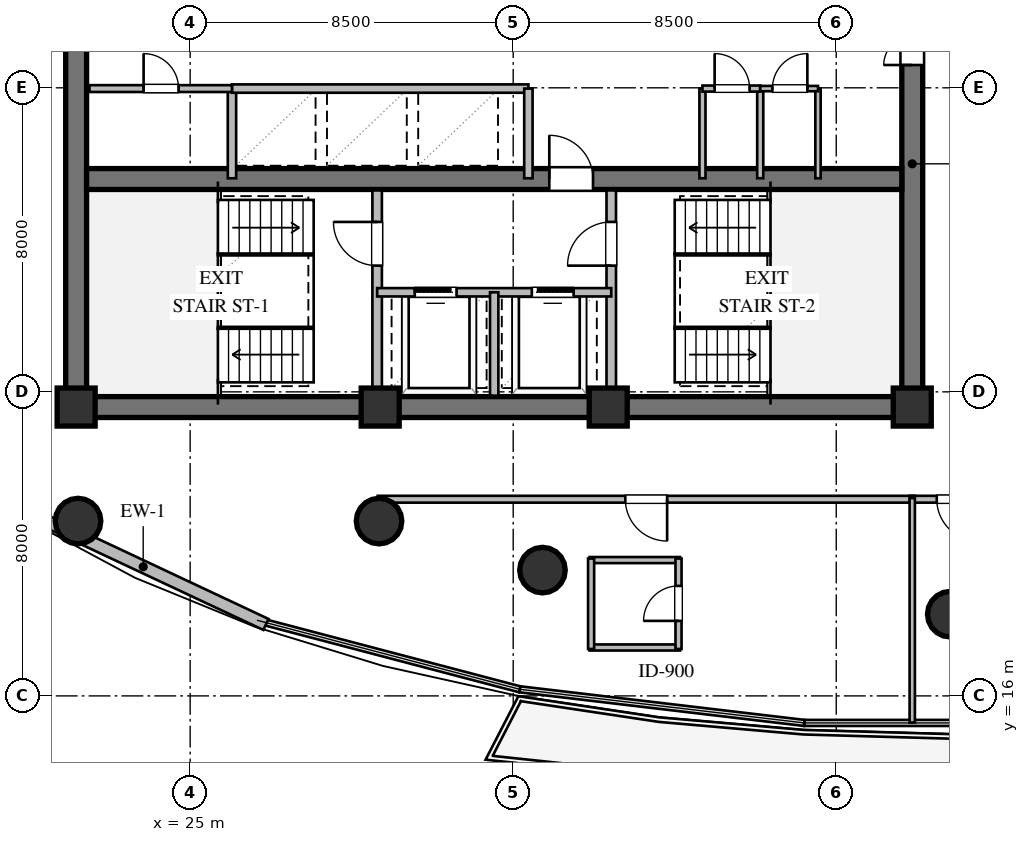
"""IFC4 building model, lengths in metres.
Left out: names, types, materials, properties, quantities, classifications, styles, units other than length and angle.
Written with IfcOpenShell. Run it as: python <this file> out.ifc"""

import sys

from ifc_helpers import new_model, si_unit, direction, frame, frame_2d, origin, origin_2d, place, context, subcontext, project, spatial, rectangle, circle, extrude, element, fill, save


model = new_model("IFC4")
c1 = context("Model", 3, precision=1e-05, world=origin(), true_north=direction((0.0, 1.0)))
c2 = subcontext(c1, "Body", "Model", "MODEL_VIEW")
j1 = project(units=[si_unit("LENGTHUNIT", "METRE"), si_unit("PLANEANGLEUNIT", "RADIAN")], contexts=[c1])
p1 = place(None, origin())
s1 = spatial("IfcSite", under=j1, at=p1, CompositionType="ELEMENT")
p2 = place(p1, origin())
s2 = spatial("IfcBuilding", under=s1, at=p2, CompositionType="ELEMENT")
p3 = place(p2, frame((0.0, 0.0, 163.8)))
s3 = spatial("IfcBuildingStorey", under=s2, at=p3, CompositionType="ELEMENT", Elevation=163.8)
p4 = place(p3, frame((21.725, 23.6, 0.0), z_axis=(0.0, 0.0, 1.0), x_axis=(1.0, 0.0, 0.0)))
e1 = element("IfcWall", 1, at=p4, inside=s3, PredefinedType="SHEAR", context=c2, shape_type="SweptSolid", body=[
    extrude(rectangle(XDim=22.55, YDim=0.55, at=frame_2d((11.275, 0.0))), origin(), (0.0, 0.0, 1.0), 3.36),
])
p5 = place(p3, frame((22.0, 23.875, 0.0), z_axis=(0.0, 0.0, 1.0), x_axis=(0.0, 1.0, 0.0)))
e2 = element("IfcWall", 2, at=p5, inside=s3, PredefinedType="SHEAR", context=c2, shape_type="SweptSolid", body=[
    extrude(rectangle(XDim=12.25, YDim=0.55, at=frame_2d((6.125, 0.0))), origin(), (0.0, 0.0, 1.0), 3.36),
])
p6 = place(p3, frame((44.0, 23.875, 0.0), z_axis=(0.0, 0.0, 1.0), x_axis=(0.0, 1.0, 0.0)))
e3 = element("IfcWall", 3, at=p6, inside=s3, PredefinedType="SHEAR", context=c2, shape_type="SweptSolid", body=[
    extrude(rectangle(XDim=12.25, YDim=0.55, at=frame_2d((6.125, 0.0))), origin(), (0.0, 0.0, 1.0), 3.36),
])
p7 = place(p6, frame((8.725, 0.0, 0.0)))
e4 = element("IfcOpeningElement", 4, at=p7, cuts=e3, PredefinedType="OPENING", context=c2, shape_type="SweptSolid", body=[
    extrude(rectangle(XDim=1.5, YDim=2.15, at=frame_2d((0.75, 1.075))), frame((0.0, 0.285, 0.0), z_axis=(0.0, -1.0, 0.0), x_axis=(1.0, 0.0, 0.0)), (0.0, 0.0, 1.0), 0.57),
])
p8 = place(p3, frame((22.275, 29.6, 0.0), z_axis=(0.0, 0.0, 1.0), x_axis=(1.0, 0.0, 0.0)))
e5 = element("IfcWall", 5, at=p8, inside=s3, PredefinedType="SHEAR", context=c2, shape_type="SweptSolid", body=[
    extrude(rectangle(XDim=21.45, YDim=0.55, at=frame_2d((10.725, 0.0))), origin(), (0.0, 0.0, 1.0), 3.36),
])
p9 = place(p8, frame((12.175, 0.0, 0.0)))
e6 = element("IfcOpeningElement", 6, at=p9, cuts=e5, PredefinedType="OPENING", context=c2, shape_type="SweptSolid", body=[
    extrude(rectangle(XDim=1.15, YDim=2.1, at=frame_2d((0.575, 1.05))), frame((0.0, 0.285, 0.0), z_axis=(0.0, -1.0, 0.0), x_axis=(1.0, 0.0, 0.0)), (0.0, 0.0, 1.0), 0.57),
])
for number, where, z_axis, x_axis in (
    (7, (22.0, 23.6, 0.0), (0.0, 0.0, 1.0), (1.0, 0.0, 0.0)),
    (8, (30.0, 23.6, 0.0), (0.0, 0.0, 1.0), (1.0, 0.0, 0.0)),
    (9, (36.0, 23.6, 0.0), (0.0, 0.0, 1.0), (1.0, 0.0, 0.0)),
    (10, (44.0, 23.6, 0.0), (0.0, 0.0, 1.0), (1.0, 0.0, 0.0)),
):
    element("IfcColumn", number, at=place(p3, frame(where, z_axis=z_axis, x_axis=x_axis)), inside=s3, PredefinedType="COLUMN", context=c2, shape_type="SweptSolid", body=[
        extrude(rectangle(XDim=1.0, YDim=1.0, at=origin_2d()), origin(), (0.0, 0.0, 1.0), 3.6),
    ])
for number, where, z_axis, x_axis in (
    (11, (22.05, 20.6, 0.0), (0.0, 0.0, 1.0), (1.0, 0.0, 0.0)),
    (12, (29.97, 20.6, 0.0), (0.0, 0.0, 1.0), (1.0, 0.0, 0.0)),
    (13, (34.27, 19.31, 0.0), (0.0, 0.0, 1.0), (1.0, 0.0, 0.0)),
    (14, (45.0, 18.15, 0.0), (0.0, 0.0, 1.0), (1.0, 0.0, 0.0)),
):
    element("IfcColumn", number, at=place(p3, frame(where, z_axis=z_axis, x_axis=x_axis)), inside=s3, PredefinedType="COLUMN", context=c2, shape_type="SweptSolid", body=[
        extrude(circle(Radius=0.6, at=origin_2d()), origin(), (0.0, 0.0, 1.0), 3.6),
    ])
p10 = place(p3, frame((26.994, 17.88, 0.0), z_axis=(0.0, 0.0, 1.0), x_axis=(-0.905106920297, 0.425184034073, 0.0)))
e15 = element("IfcWall", 15, at=p10, inside=s3, PredefinedType="STANDARD", context=c2, shape_type="SweptSolid", body=[
    extrude(rectangle(XDim=7.136, YDim=0.32, at=frame_2d((3.568, 0.0))), origin(), (0.0, 0.0, 1.0), 2.657),
])
p11 = place(p3, frame((29.92, 23.9, 0.0), z_axis=(0.0, 0.0, 1.0), x_axis=(0.0, 1.0, 0.0)))
e16 = element("IfcWall", 16, at=p11, inside=s3, PredefinedType="SOLIDWALL", context=c2, shape_type="SweptSolid", body=[
    extrude(rectangle(XDim=5.4, YDim=0.25, at=frame_2d((2.7, 0.0))), origin(), (0.0, 0.0, 1.0), 2.89),
])
p12 = place(p11, frame((3.421, 0.0, 0.0)))
e17 = element("IfcOpeningElement", 17, at=p12, cuts=e16, PredefinedType="OPENING", context=c2, shape_type="SweptSolid", body=[
    extrude(rectangle(XDim=1.15, YDim=2.1, at=frame_2d((0.575, 1.05))), frame((0.0, 0.135, 0.0), z_axis=(0.0, -1.0, 0.0), x_axis=(1.0, 0.0, 0.0)), (0.0, 0.0, 1.0), 0.27),
])
p13 = place(p3, frame((36.08, 23.9, 0.0), z_axis=(0.0, 0.0, 1.0), x_axis=(0.0, 1.0, 0.0)))
e18 = element("IfcWall", 18, at=p13, inside=s3, PredefinedType="SOLIDWALL", context=c2, shape_type="SweptSolid", body=[
    extrude(rectangle(XDim=5.4, YDim=0.25, at=frame_2d((2.7, 0.0))), origin(), (0.0, 0.0, 1.0), 3.36),
])
p14 = place(p13, frame((3.421, 0.0, 0.0)))
e19 = element("IfcOpeningElement", 19, at=p14, cuts=e18, PredefinedType="OPENING", context=c2, shape_type="SweptSolid", body=[
    extrude(rectangle(XDim=1.15, YDim=2.1, at=frame_2d((0.575, 1.05))), frame((0.0, 0.135, 0.0), z_axis=(0.0, -1.0, 0.0), x_axis=(1.0, 0.0, 0.0)), (0.0, 0.0, 1.0), 0.27),
])
p15 = place(p3, frame((29.92, 26.62, 0.0), z_axis=(0.0, 0.0, 1.0), x_axis=(1.0, 0.0, 0.0)))
e20 = element("IfcWall", 20, at=p15, inside=s3, PredefinedType="SOLIDWALL", context=c2, shape_type="SweptSolid", body=[
    extrude(rectangle(XDim=6.16, YDim=0.22, at=frame_2d((3.08, 0.0))), origin(), (0.0, 0.0, 1.0), 3.36),
])
p16 = place(p15, frame((0.99, 0.0, 0.0)))
e21 = element("IfcOpeningElement", 21, at=p16, cuts=e20, PredefinedType="OPENING", context=c2, shape_type="SweptSolid", body=[
    extrude(rectangle(XDim=1.1, YDim=2.1, at=frame_2d((0.55, 1.05))), frame((0.0, 0.12, 0.0), z_axis=(0.0, -1.0, 0.0), x_axis=(1.0, 0.0, 0.0)), (0.0, 0.0, 1.0), 0.24),
])
p17 = place(p15, frame((4.07, 0.0, 0.0)))
e22 = element("IfcOpeningElement", 22, at=p17, cuts=e20, PredefinedType="OPENING", context=c2, shape_type="SweptSolid", body=[
    extrude(rectangle(XDim=1.1, YDim=2.1, at=frame_2d((0.55, 1.05))), frame((0.0, 0.12, 0.0), z_axis=(0.0, -1.0, 0.0), x_axis=(1.0, 0.0, 0.0)), (0.0, 0.0, 1.0), 0.24),
])
p18 = place(p3, frame((33.0, 23.9, 0.0), z_axis=(0.0, 0.0, 1.0), x_axis=(0.0, 1.0, 0.0)))
e23 = element("IfcWall", 23, at=p18, inside=s3, PredefinedType="SOLIDWALL", context=c2, shape_type="SweptSolid", body=[
    extrude(rectangle(XDim=2.72, YDim=0.22, at=frame_2d((1.36, 0.0))), origin(), (0.0, 0.0, 1.0), 3.36),
])
p19 = place(p3, frame((26.1, 29.62, 0.0), z_axis=(0.0, 0.0, 1.0), x_axis=(0.0, 1.0, 0.0)))
e24 = element("IfcWall", 24, at=p19, inside=s3, PredefinedType="SOLIDWALL", context=c2, shape_type="SweptSolid", body=[
    extrude(rectangle(XDim=2.36, YDim=0.22, at=frame_2d((1.18, 0.0))), origin(), (0.0, 0.0, 1.0), 3.36),
])
p20 = place(p3, frame((26.1, 31.98, 0.0), z_axis=(0.0, 0.0, 1.0), x_axis=(1.0, 0.0, 0.0)))
e25 = element("IfcWall", 25, at=p20, inside=s3, PredefinedType="SOLIDWALL", context=c2, shape_type="SweptSolid", body=[
    extrude(rectangle(XDim=7.8, YDim=0.22, at=frame_2d((3.9, 0.0))), origin(), (0.0, 0.0, 1.0), 3.36),
])
p21 = place(p3, frame((33.9, 29.62, 0.0), z_axis=(0.0, 0.0, 1.0), x_axis=(0.0, 1.0, 0.0)))
e26 = element("IfcWall", 26, at=p21, inside=s3, PredefinedType="SOLIDWALL", context=c2, shape_type="SweptSolid", body=[
    extrude(rectangle(XDim=2.36, YDim=0.22, at=frame_2d((1.18, 0.0))), origin(), (0.0, 0.0, 1.0), 3.36),
])
p22 = place(p3, frame((22.35, 31.98, 0.0), z_axis=(0.0, 0.0, 1.0), x_axis=(1.0, 0.0, 0.0)))
e27 = element("IfcWall", 27, at=p22, inside=s3, PredefinedType="PARTITIONING", context=c2, shape_type="SweptSolid", body=[
    extrude(rectangle(XDim=3.75, YDim=0.18, at=frame_2d((1.875, 0.0))), origin(), (0.0, 0.0, 1.0), 3.36),
])
p23 = place(p22, frame((1.425, 0.0, 0.0)))
e28 = element("IfcOpeningElement", 28, at=p23, cuts=e27, PredefinedType="OPENING", context=c2, shape_type="SweptSolid", body=[
    extrude(rectangle(XDim=0.92, YDim=2.1, at=frame_2d((0.46, 1.05))), frame((0.0, 0.1, 0.0), z_axis=(0.0, -1.0, 0.0), x_axis=(1.0, 0.0, 0.0)), (0.0, 0.0, 1.0), 0.2),
])
for number, where, z_axis, x_axis in (
    (29, (38.48, 29.62, 0.0), (0.0, 0.0, 1.0), (0.0, 1.0, 0.0)),
    (30, (40.0, 29.62, 0.0), (0.0, 0.0, 1.0), (0.0, 1.0, 0.0)),
):
    element("IfcWall", number, at=place(p3, frame(where, z_axis=z_axis, x_axis=x_axis)), inside=s3, PredefinedType="PLUMBINGWALL", context=c2, shape_type="SweptSolid", body=[
        extrude(rectangle(XDim=2.36, YDim=0.16, at=frame_2d((1.18, 0.0))), origin(), (0.0, 0.0, 1.0), 3.36),
    ])
p24 = place(p3, frame((41.52, 29.62, 0.0), z_axis=(0.0, 0.0, 1.0), x_axis=(0.0, 1.0, 0.0)))
e31 = element("IfcWall", 31, at=p24, inside=s3, PredefinedType="PARTITIONING", context=c2, shape_type="SweptSolid", body=[
    extrude(rectangle(XDim=2.36, YDim=0.14, at=frame_2d((1.18, 0.0))), origin(), (0.0, 0.0, 1.0), 3.36),
])
p25 = place(p3, frame((38.48, 31.98, 0.0), z_axis=(0.0, 0.0, 1.0), x_axis=(1.0, 0.0, 0.0)))
e32 = element("IfcWall", 32, at=p25, inside=s3, PredefinedType="PLUMBINGWALL", context=c2, shape_type="SweptSolid", body=[
    extrude(rectangle(XDim=1.52, YDim=0.16, at=frame_2d((0.76, 0.0))), origin(), (0.0, 0.0, 1.0), 3.36),
])
p26 = place(p25, frame((0.32, 0.0, 0.0)))
e33 = element("IfcOpeningElement", 33, at=p26, cuts=e32, PredefinedType="OPENING", context=c2, shape_type="SweptSolid", body=[
    extrude(rectangle(XDim=0.92, YDim=2.1, at=frame_2d((0.46, 1.05))), frame((0.0, 0.09, 0.0), z_axis=(0.0, -1.0, 0.0), x_axis=(1.0, 0.0, 0.0)), (0.0, 0.0, 1.0), 0.18),
])
p27 = place(p3, frame((40.0, 31.98, 0.0), z_axis=(0.0, 0.0, 1.0), x_axis=(1.0, 0.0, 0.0)))
e34 = element("IfcWall", 34, at=p27, inside=s3, PredefinedType="PARTITIONING", context=c2, shape_type="SweptSolid", body=[
    extrude(rectangle(XDim=1.52, YDim=0.14, at=frame_2d((0.76, 0.0))), origin(), (0.0, 0.0, 1.0), 3.36),
])
p28 = place(p27, frame((0.32, 0.0, 0.0)))
e35 = element("IfcOpeningElement", 35, at=p28, cuts=e34, PredefinedType="OPENING", context=c2, shape_type="SweptSolid", body=[
    extrude(rectangle(XDim=0.92, YDim=2.1, at=frame_2d((0.46, 1.05))), frame((0.0, 0.08, 0.0), z_axis=(0.0, -1.0, 0.0), x_axis=(1.0, 0.0, 0.0)), (0.0, 0.0, 1.0), 0.16),
])
p29 = place(p3, frame((35.51, 17.274, 0.0), z_axis=(0.0, 0.0, 1.0), x_axis=(1.0, 0.0, 0.0)))
e36 = element("IfcWall", 36, at=p29, inside=s3, PredefinedType="PLUMBINGWALL", context=c2, shape_type="SweptSolid", body=[
    extrude(rectangle(XDim=2.38, YDim=0.16, at=frame_2d((1.19, 0.0))), origin(), (0.0, 0.0, 1.0), 3.36),
])
p30 = place(p3, frame((35.51, 19.574, 0.0), z_axis=(0.0, 0.0, 1.0), x_axis=(1.0, 0.0, 0.0)))
e37 = element("IfcWall", 37, at=p30, inside=s3, PredefinedType="PLUMBINGWALL", context=c2, shape_type="SweptSolid", body=[
    extrude(rectangle(XDim=2.38, YDim=0.16, at=frame_2d((1.19, 0.0))), origin(), (0.0, 0.0, 1.0), 2.657),
])
p31 = place(p3, frame((35.55, 17.234, 0.0), z_axis=(0.0, 0.0, 1.0), x_axis=(0.0, 1.0, 0.0)))
e38 = element("IfcWall", 38, at=p31, inside=s3, PredefinedType="PLUMBINGWALL", context=c2, shape_type="SweptSolid", body=[
    extrude(rectangle(XDim=2.38, YDim=0.16, at=frame_2d((1.19, 0.0))), origin(), (0.0, 0.0, 1.0), 3.36),
])
p32 = place(p3, frame((37.85, 17.234, 0.0), z_axis=(0.0, 0.0, 1.0), x_axis=(0.0, 1.0, 0.0)))
e39 = element("IfcWall", 39, at=p32, inside=s3, PredefinedType="PLUMBINGWALL", context=c2, shape_type="SweptSolid", body=[
    extrude(rectangle(XDim=2.38, YDim=0.16, at=frame_2d((1.19, 0.0))), origin(), (0.0, 0.0, 1.0), 3.36),
])
p33 = place(p32, frame((0.74, 0.0, 0.0)))
e40 = element("IfcOpeningElement", 40, at=p33, cuts=e39, PredefinedType="OPENING", context=c2, shape_type="SweptSolid", body=[
    extrude(rectangle(XDim=0.92, YDim=2.1, at=frame_2d((0.46, 1.05))), frame((0.0, 0.09, 0.0), z_axis=(0.0, -1.0, 0.0), x_axis=(1.0, 0.0, 0.0)), (0.0, 0.0, 1.0), 0.18),
])
p34 = place(p3, frame((44.065, 21.175, 0.0), z_axis=(0.0, 0.0, 1.0), x_axis=(-1.0, 0.0, 0.0)))
e41 = element("IfcWall", 41, at=p34, inside=s3, PredefinedType="PARTITIONING", context=c2, shape_type="SweptSolid", body=[
    extrude(rectangle(XDim=14.13, YDim=0.18, at=frame_2d((7.065, 0.0))), origin(), (0.0, 0.0, 1.0), 2.657),
])
p35 = place(p34, frame((6.515, 0.0, 0.0)))
e42 = element("IfcOpeningElement", 42, at=p35, cuts=e41, PredefinedType="OPENING", context=c2, shape_type="SweptSolid", body=[
    extrude(rectangle(XDim=1.1, YDim=2.1, at=frame_2d((0.55, 1.05))), frame((0.0, 0.1, 0.0), z_axis=(0.0, -1.0, 0.0), x_axis=(1.0, 0.0, 0.0)), (0.0, 0.0, 1.0), 0.2),
])
p36 = place(p3, frame((46.455, 21.175, 0.0), z_axis=(0.0, 0.0, 1.0), x_axis=(-1.0, 0.0, 0.0)))
e43 = element("IfcWall", 43, at=p36, inside=s3, PredefinedType="PARTITIONING", context=c2, shape_type="SweptSolid", body=[
    extrude(rectangle(XDim=2.52, YDim=0.18, at=frame_2d((1.26, 0.0))), origin(), (0.0, 0.0, 1.0), 2.996),
])
p37 = place(p36, frame((0.71, 0.0, 0.0)))
e44 = element("IfcOpeningElement", 44, at=p37, cuts=e43, PredefinedType="OPENING", context=c2, shape_type="SweptSolid", body=[
    extrude(rectangle(XDim=1.1, YDim=2.1, at=frame_2d((0.55, 1.05))), frame((0.0, 0.1, 0.0), z_axis=(0.0, -1.0, 0.0), x_axis=(1.0, 0.0, 0.0)), (0.0, 0.0, 1.0), 0.2),
])
p38 = place(p3, frame((44.0, 21.205, 0.0), z_axis=(0.0, 0.0, 1.0), x_axis=(0.0, -1.0, 0.0)))
e45 = element("IfcWall", 45, at=p38, inside=s3, PredefinedType="PARTITIONING", context=c2, shape_type="SweptSolid", body=[
    extrude(rectangle(XDim=5.906, YDim=0.14, at=frame_2d((2.953, 0.0))), origin(), (0.0, 0.0, 1.0), 2.89),
])
p39 = place(p12, origin())
e46 = element("IfcDoor", 46, at=p39, inside=s3, OperationType="SINGLE_SWING_RIGHT", PredefinedType="DOOR", context=c2, shape_type="SweptSolid", body=[
    extrude(rectangle(XDim=1.15, YDim=2.1, at=frame_2d((0.575, 1.05))), frame((0.0, 0.025, 0.0), z_axis=(0.0, -1.0, 0.0), x_axis=(1.0, 0.0, 0.0)), (0.0, 0.0, 1.0), 0.05),
])
fill(e17, e46)
p40 = place(p14, origin())
e47 = element("IfcDoor", 47, at=p40, inside=s3, OperationType="SINGLE_SWING_LEFT", PredefinedType="DOOR", context=c2, shape_type="SweptSolid", body=[
    extrude(rectangle(XDim=1.15, YDim=2.1, at=frame_2d((0.575, 1.05))), frame((0.0, 0.025, 0.0), z_axis=(0.0, -1.0, 0.0), x_axis=(1.0, 0.0, 0.0)), (0.0, 0.0, 1.0), 0.05),
])
fill(e19, e47)
p41 = place(p16, origin())
e48 = element("IfcDoor", 48, at=p41, inside=s3, OperationType="SLIDING_TO_LEFT", PredefinedType="DOOR", context=c2, shape_type="SweptSolid", body=[
    extrude(rectangle(XDim=1.1, YDim=2.1, at=frame_2d((0.55, 1.05))), frame((0.0, 0.025, 0.0), z_axis=(0.0, -1.0, 0.0), x_axis=(1.0, 0.0, 0.0)), (0.0, 0.0, 1.0), 0.05),
])
fill(e21, e48)
p42 = place(p17, origin())
e49 = element("IfcDoor", 49, at=p42, inside=s3, OperationType="SLIDING_TO_RIGHT", PredefinedType="DOOR", context=c2, shape_type="SweptSolid", body=[
    extrude(rectangle(XDim=1.1, YDim=2.1, at=frame_2d((0.55, 1.05))), frame((0.0, 0.025, 0.0), z_axis=(0.0, -1.0, 0.0), x_axis=(1.0, 0.0, 0.0)), (0.0, 0.0, 1.0), 0.05),
])
fill(e22, e49)
p43 = place(p9, origin())
e50 = element("IfcDoor", 50, at=p43, inside=s3, OperationType="SINGLE_SWING_LEFT", PredefinedType="DOOR", context=c2, shape_type="SweptSolid", body=[
    extrude(rectangle(XDim=1.15, YDim=2.1, at=frame_2d((0.575, 1.05))), frame((0.0, 0.025, 0.0), z_axis=(0.0, -1.0, 0.0), x_axis=(1.0, 0.0, 0.0)), (0.0, 0.0, 1.0), 0.05),
])
fill(e6, e50)
p44 = place(p7, origin())
e51 = element("IfcDoor", 51, at=p44, inside=s3, OperationType="DOUBLE_DOOR_SINGLE_SWING", PredefinedType="DOOR", context=c2, shape_type="SweptSolid", body=[
    extrude(rectangle(XDim=1.5, YDim=2.15, at=frame_2d((0.75, 1.075))), frame((0.0, 0.025, 0.0), z_axis=(0.0, -1.0, 0.0), x_axis=(1.0, 0.0, 0.0)), (0.0, 0.0, 1.0), 0.05),
])
fill(e4, e51)
p45 = place(p23, origin())
e52 = element("IfcDoor", 52, at=p45, inside=s3, OperationType="SINGLE_SWING_LEFT", PredefinedType="DOOR", context=c2, shape_type="SweptSolid", body=[
    extrude(rectangle(XDim=0.92, YDim=2.1, at=frame_2d((0.46, 1.05))), frame((0.0, 0.025, 0.0), z_axis=(0.0, -1.0, 0.0), x_axis=(1.0, 0.0, 0.0)), (0.0, 0.0, 1.0), 0.05),
])
fill(e28, e52)
p46 = place(p26, origin())
e53 = element("IfcDoor", 53, at=p46, inside=s3, OperationType="SINGLE_SWING_LEFT", PredefinedType="DOOR", context=c2, shape_type="SweptSolid", body=[
    extrude(rectangle(XDim=0.92, YDim=2.1, at=frame_2d((0.46, 1.05))), frame((0.0, 0.025, 0.0), z_axis=(0.0, -1.0, 0.0), x_axis=(1.0, 0.0, 0.0)), (0.0, 0.0, 1.0), 0.05),
])
fill(e33, e53)
p47 = place(p28, origin())
e54 = element("IfcDoor", 54, at=p47, inside=s3, OperationType="SINGLE_SWING_RIGHT", PredefinedType="DOOR", context=c2, shape_type="SweptSolid", body=[
    extrude(rectangle(XDim=0.92, YDim=2.1, at=frame_2d((0.46, 1.05))), frame((0.0, 0.025, 0.0), z_axis=(0.0, -1.0, 0.0), x_axis=(1.0, 0.0, 0.0)), (0.0, 0.0, 1.0), 0.05),
])
fill(e35, e54)
p48 = place(p33, origin())
e55 = element("IfcDoor", 55, at=p48, inside=s3, OperationType="SINGLE_SWING_LEFT", PredefinedType="DOOR", context=c2, shape_type="SweptSolid", body=[
    extrude(rectangle(XDim=0.92, YDim=2.1, at=frame_2d((0.46, 1.05))), frame((0.0, 0.025, 0.0), z_axis=(0.0, -1.0, 0.0), x_axis=(1.0, 0.0, 0.0)), (0.0, 0.0, 1.0), 0.05),
])
fill(e40, e55)
p49 = place(p35, origin())
e56 = element("IfcDoor", 56, at=p49, inside=s3, OperationType="SINGLE_SWING_LEFT", PredefinedType="DOOR", context=c2, shape_type="SweptSolid", body=[
    extrude(rectangle(XDim=1.1, YDim=2.1, at=frame_2d((0.55, 1.05))), frame((0.0, 0.025, 0.0), z_axis=(0.0, -1.0, 0.0), x_axis=(1.0, 0.0, 0.0)), (0.0, 0.0, 1.0), 0.05),
])
fill(e42, e56)
p50 = place(p37, origin())
e57 = element("IfcDoor", 57, at=p50, inside=s3, OperationType="SINGLE_SWING_LEFT", PredefinedType="DOOR", context=c2, shape_type="SweptSolid", body=[
    extrude(rectangle(XDim=1.1, YDim=2.1, at=frame_2d((0.55, 1.05))), frame((0.0, 0.025, 0.0), z_axis=(0.0, -1.0, 0.0), x_axis=(1.0, 0.0, 0.0)), (0.0, 0.0, 1.0), 0.05),
])
fill(e44, e57)
save(model, sys.argv[1])
